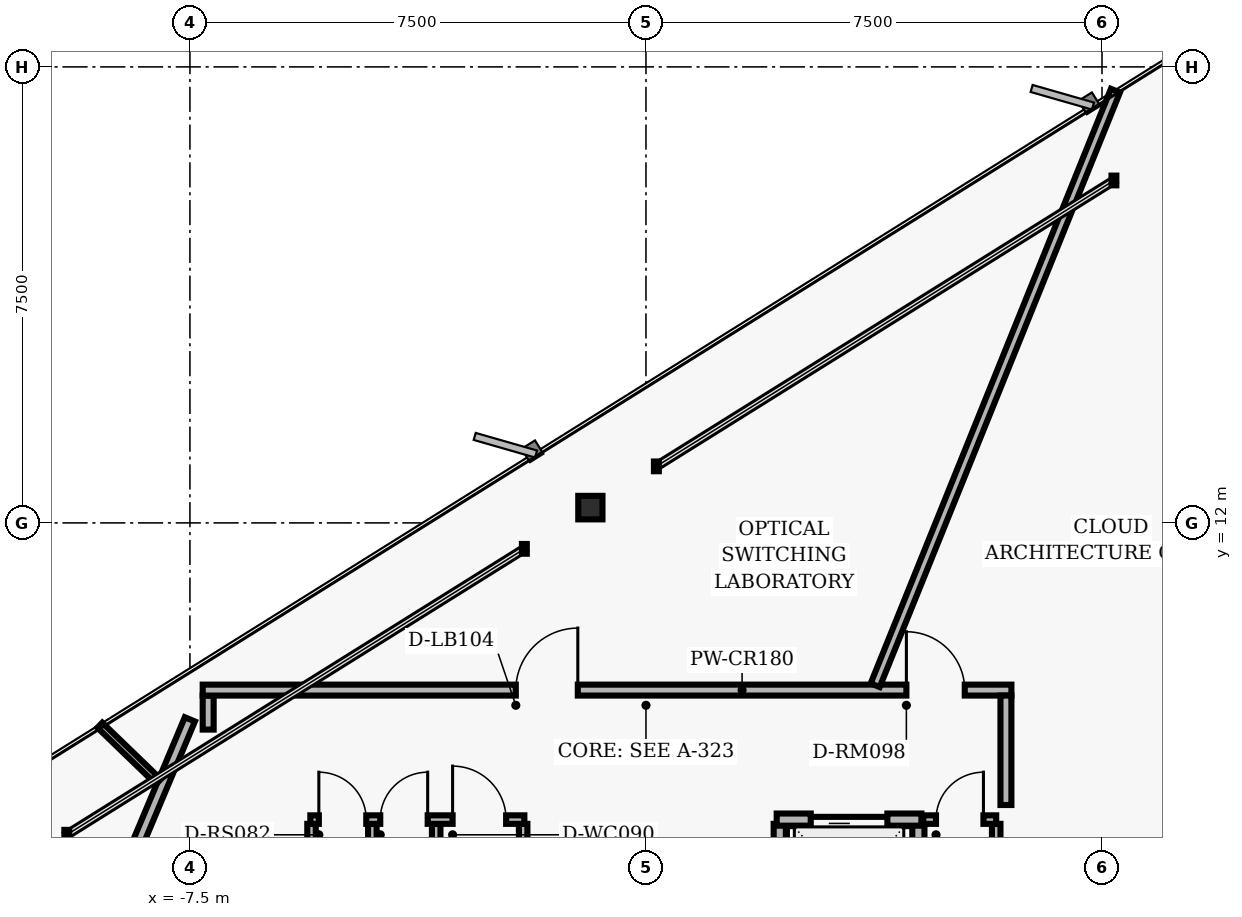
"""IFC4 building model, lengths in metres.
Left out: names, types, materials, properties, quantities, classifications, styles, units other than length and angle.
Written with IfcOpenShell. Run it as: python <this file> out.ifc"""

import sys

from ifc_helpers import new_model, si_unit, direction, frame, frame_2d, origin, origin_2d, place, context, subcontext, project, spatial, rectangle, i_section, extrude, element, fill, save


model = new_model("IFC4")
c1 = context("Model", 3, precision=1e-05, world=origin(), true_north=direction((0.0, 1.0)))
c2 = subcontext(c1, "Body", "Model", "MODEL_VIEW")
j1 = project(units=[si_unit("LENGTHUNIT", "METRE"), si_unit("PLANEANGLEUNIT", "RADIAN")], contexts=[c1])
p1 = place(None, origin())
s1 = spatial("IfcSite", under=j1, at=p1, CompositionType="ELEMENT")
p2 = place(p1, origin())
s2 = spatial("IfcBuilding", under=s1, at=p2, CompositionType="ELEMENT")
p3 = place(p2, frame((0.0, 0.0, 202.72)))
s3 = spatial("IfcBuildingStorey", under=s2, at=p3, CompositionType="ELEMENT", Elevation=202.72)
p4 = place(p3, frame((-0.915, 12.251, 0.0), z_axis=(0.0, 0.0, 1.0), x_axis=(1.0, 0.0, 0.0)))
e1 = element("IfcColumn", 1, at=p4, inside=s3, PredefinedType="COLUMN", context=c2, shape_type="SweptSolid", body=[
    extrude(i_section(OverallWidth=0.398, OverallDepth=0.387, WebThickness=0.021, FlangeThickness=0.033, FilletRadius=0.018, at=origin_2d()), origin(), (0.0, 0.0, 1.0), 3.04),
])
for number, where, z_axis, x_axis in (
    (2, (2.2, 4.95, 0.0), (0.0, 0.0, 1.0), (0.0, 1.0, 0.0)),
    (3, (4.48, 4.95, 0.0), (0.0, 0.0, 1.0), (0.0, 1.0, 0.0)),
):
    element("IfcWall", number, at=place(p3, frame(where, z_axis=z_axis, x_axis=x_axis)), inside=s3, PredefinedType="PARTITIONING", context=c2, shape_type="SweptSolid", body=[
        extrude(rectangle(XDim=2.1, YDim=0.2, at=frame_2d((1.05, 0.0))), origin(), (0.0, 0.0, 1.0), 2.773),
    ])
p5 = place(p3, frame((2.15, 7.12, 0.0), z_axis=(0.0, 0.0, 1.0), x_axis=(1.0, 0.0, 0.0)))
e4 = element("IfcWall", 4, at=p5, inside=s3, PredefinedType="PARTITIONING", context=c2, shape_type="SweptSolid", body=[
    extrude(rectangle(XDim=2.38, YDim=0.2, at=frame_2d((1.19, 0.0))), origin(), (0.0, 0.0, 1.0), 2.773),
])
p6 = place(p5, frame((0.56, 0.0, 0.0)))
e5 = element("IfcOpeningElement", 5, at=p6, cuts=e4, PredefinedType="OPENING", context=c2, shape_type="SweptSolid", body=[
    extrude(rectangle(XDim=1.26, YDim=2.06, at=frame_2d((0.63, 1.03))), frame((0.0, 0.11, 0.0), z_axis=(0.0, -1.0, 0.0), x_axis=(1.0, 0.0, 0.0)), (0.0, 0.0, 1.0), 0.22),
])
for number, where, z_axis, x_axis in (
    (6, (-5.5, 4.95, 0.0), (0.0, 0.0, 1.0), (0.0, 1.0, 0.0)),
    (7, (-4.5, 4.95, 0.0), (0.0, 0.0, 1.0), (0.0, 1.0, 0.0)),
    (8, (-3.45, 4.95, 0.0), (0.0, 0.0, 1.0), (0.0, 1.0, 0.0)),
    (9, (-2.02, 4.95, 0.0), (0.0, 0.0, 1.0), (0.0, 1.0, 0.0)),
):
    element("IfcWall", number, at=place(p3, frame(where, z_axis=z_axis, x_axis=x_axis)), inside=s3, PredefinedType="PARTITIONING", context=c2, shape_type="SweptSolid", body=[
        extrude(rectangle(XDim=2.1, YDim=0.14, at=frame_2d((1.05, 0.0))), origin(), (0.0, 0.0, 1.0), 2.773),
    ])
p7 = place(p3, frame((-5.52, 7.12, 0.0), z_axis=(0.0, 0.0, 1.0), x_axis=(1.0, 0.0, 0.0)))
e10 = element("IfcWall", 10, at=p7, inside=s3, PredefinedType="PARTITIONING", context=c2, shape_type="SweptSolid", body=[
    extrude(rectangle(XDim=3.52, YDim=0.14, at=frame_2d((1.76, 0.0))), origin(), (0.0, 0.0, 1.0), 2.773),
])
p8 = place(p7, frame((0.14, 0.0, 0.0)))
e11 = element("IfcOpeningElement", 11, at=p8, cuts=e10, PredefinedType="OPENING", context=c2, shape_type="SweptSolid", body=[
    extrude(rectangle(XDim=0.78, YDim=2.01, at=frame_2d((0.39, 1.005))), frame((0.0, 0.08, 0.0), z_axis=(0.0, -1.0, 0.0), x_axis=(1.0, 0.0, 0.0)), (0.0, 0.0, 1.0), 0.16),
])
p9 = place(p7, frame((1.15, 0.0, 0.0)))
e12 = element("IfcOpeningElement", 12, at=p9, cuts=e10, PredefinedType="OPENING", context=c2, shape_type="SweptSolid", body=[
    extrude(rectangle(XDim=0.78, YDim=2.01, at=frame_2d((0.39, 1.005))), frame((0.0, 0.08, 0.0), z_axis=(0.0, -1.0, 0.0), x_axis=(1.0, 0.0, 0.0)), (0.0, 0.0, 1.0), 0.16),
])
p10 = place(p7, frame((2.34, 0.0, 0.0)))
e13 = element("IfcOpeningElement", 13, at=p10, cuts=e10, PredefinedType="OPENING", context=c2, shape_type="SweptSolid", body=[
    extrude(rectangle(XDim=0.88, YDim=2.02, at=frame_2d((0.44, 1.01))), frame((0.0, 0.08, 0.0), z_axis=(0.0, -1.0, 0.0), x_axis=(1.0, 0.0, 0.0)), (0.0, 0.0, 1.0), 0.16),
])
p11 = place(p3, frame((5.76, 4.95, 0.0), z_axis=(0.0, 0.0, 1.0), x_axis=(0.0, 1.0, 0.0)))
e14 = element("IfcWall", 14, at=p11, inside=s3, PredefinedType="PARTITIONING", context=c2, shape_type="SweptSolid", body=[
    extrude(rectangle(XDim=2.1, YDim=0.14, at=frame_2d((1.05, 0.0))), origin(), (0.0, 0.0, 1.0), 2.253),
])
p12 = place(p3, frame((4.56, 7.12, 0.0), z_axis=(0.0, 0.0, 1.0), x_axis=(1.0, 0.0, 0.0)))
e15 = element("IfcWall", 15, at=p12, inside=s3, PredefinedType="PARTITIONING", context=c2, shape_type="SweptSolid", body=[
    extrude(rectangle(XDim=1.2, YDim=0.14, at=frame_2d((0.6, 0.0))), origin(), (0.0, 0.0, 1.0), 2.773),
])
p13 = place(p12, frame((0.21, 0.0, 0.0)))
e16 = element("IfcOpeningElement", 16, at=p13, cuts=e15, PredefinedType="OPENING", context=c2, shape_type="SweptSolid", body=[
    extrude(rectangle(XDim=0.78, YDim=2.01, at=frame_2d((0.39, 1.005))), frame((0.0, 0.08, 0.0), z_axis=(0.0, -1.0, 0.0), x_axis=(1.0, 0.0, 0.0)), (0.0, 0.0, 1.0), 0.16),
])
p14 = place(p3, frame((-9.367, 4.332, 0.0), z_axis=(0.0, 0.0, 1.0), x_axis=(0.387573945081, 0.921838617706, 0.0)))
e17 = element("IfcWall", 17, at=p14, inside=s3, PredefinedType="PARTITIONING", context=c2, shape_type="SweptSolid", body=[
    extrude(rectangle(XDim=4.813, YDim=0.18, at=frame_2d((2.407, 0.0))), origin(), (0.0, 0.0, 1.0), 2.773),
])
p15 = place(p3, frame((-7.2, 8.601, 0.0), z_axis=(0.0, 0.0, 1.0), x_axis=(0.0, 1.0, 0.0)))
e18 = element("IfcWall", 18, at=p15, inside=s3, PredefinedType="PARTITIONING", context=c2, shape_type="SweptSolid", body=[
    extrude(rectangle(XDim=0.559, YDim=0.18, at=frame_2d((0.28, 0.0))), origin(), (0.0, 0.0, 1.0), 2.773),
])
p16 = place(p3, frame((-7.29, 9.25, 0.0), z_axis=(0.0, 0.0, 1.0), x_axis=(1.0, 0.0, 0.0)))
e19 = element("IfcWall", 19, at=p16, inside=s3, PredefinedType="PARTITIONING", context=c2, shape_type="SweptSolid", body=[
    extrude(rectangle(XDim=13.3, YDim=0.18, at=frame_2d((6.65, 0.0))), origin(), (0.0, 0.0, 1.0), 2.773),
])
p17 = place(p16, frame((11.573, 0.0, 0.0)))
e20 = element("IfcOpeningElement", 20, at=p17, cuts=e19, PredefinedType="OPENING", context=c2, shape_type="SweptSolid", body=[
    extrude(rectangle(XDim=0.96, YDim=2.02, at=frame_2d((0.48, 1.01))), frame((0.0, 0.1, 0.0), z_axis=(0.0, -1.0, 0.0), x_axis=(1.0, 0.0, 0.0)), (0.0, 0.0, 1.0), 0.2),
])
p18 = place(p16, frame((5.149, 0.0, 0.0)))
e21 = element("IfcOpeningElement", 21, at=p18, cuts=e19, PredefinedType="OPENING", context=c2, shape_type="SweptSolid", body=[
    extrude(rectangle(XDim=1.02, YDim=2.02, at=frame_2d((0.51, 1.01))), frame((0.0, 0.1, 0.0), z_axis=(0.0, -1.0, 0.0), x_axis=(1.0, 0.0, 0.0)), (0.0, 0.0, 1.0), 0.2),
])
p19 = place(p3, frame((5.92, 9.16, 0.0), z_axis=(0.0, 0.0, 1.0), x_axis=(0.0, -1.0, 0.0)))
e22 = element("IfcWall", 22, at=p19, inside=s3, PredefinedType="PARTITIONING", context=c2, shape_type="SweptSolid", body=[
    extrude(rectangle(XDim=1.8, YDim=0.18, at=frame_2d((0.9, 0.0))), origin(), (0.0, 0.0, 1.0), 2.773),
])
p20 = place(p3, frame((3.77, 9.33, 0.0), z_axis=(0.0, 0.0, 1.0), x_axis=(0.374613070454, 0.927181237647, 0.0)))
e23 = element("IfcWall", 23, at=p20, inside=s3, PredefinedType="PARTITIONING", context=c2, shape_type="SweptSolid", body=[
    extrude(rectangle(XDim=10.547, YDim=0.16, at=frame_2d((5.274, 0.0))), origin(), (0.0, 0.0, 1.0), 2.773),
])
p21 = place(p3, frame((-8.019, 7.744, 0.0), z_axis=(0.0, 0.0, 1.0), x_axis=(-0.719319685721, 0.694679199151, 0.0)))
e24 = element("IfcWall", 24, at=p21, inside=s3, PredefinedType="MOVABLE", context=c2, shape_type="SweptSolid", body=[
    extrude(rectangle(XDim=1.338, YDim=0.115, at=frame_2d((0.669, 0.0))), origin(), (0.0, 0.0, 1.0), 2.773),
])
p22 = place(p6, origin())
e25 = element("IfcDoor", 25, at=p22, inside=s3, OperationType="SLIDING_TO_LEFT", PredefinedType="DOOR", context=c2, shape_type="SweptSolid", body=[
    extrude(rectangle(XDim=1.26, YDim=2.06, at=frame_2d((0.63, 1.03))), frame((0.0, 0.025, 0.0), z_axis=(0.0, -1.0, 0.0), x_axis=(1.0, 0.0, 0.0)), (0.0, 0.0, 1.0), 0.05),
])
fill(e5, e25)
p23 = place(p8, origin())
e26 = element("IfcDoor", 26, at=p23, inside=s3, OperationType="SINGLE_SWING_LEFT", PredefinedType="DOOR", context=c2, shape_type="SweptSolid", body=[
    extrude(rectangle(XDim=0.78, YDim=2.01, at=frame_2d((0.39, 1.005))), frame((0.0, 0.025, 0.0), z_axis=(0.0, -1.0, 0.0), x_axis=(1.0, 0.0, 0.0)), (0.0, 0.0, 1.0), 0.05),
])
fill(e11, e26)
p24 = place(p9, origin())
e27 = element("IfcDoor", 27, at=p24, inside=s3, OperationType="SINGLE_SWING_RIGHT", PredefinedType="DOOR", context=c2, shape_type="SweptSolid", body=[
    extrude(rectangle(XDim=0.78, YDim=2.01, at=frame_2d((0.39, 1.005))), frame((0.0, 0.025, 0.0), z_axis=(0.0, -1.0, 0.0), x_axis=(1.0, 0.0, 0.0)), (0.0, 0.0, 1.0), 0.05),
])
fill(e12, e27)
p25 = place(p10, origin())
e28 = element("IfcDoor", 28, at=p25, inside=s3, OperationType="SINGLE_SWING_LEFT", PredefinedType="DOOR", context=c2, shape_type="SweptSolid", body=[
    extrude(rectangle(XDim=0.88, YDim=2.02, at=frame_2d((0.44, 1.01))), frame((0.0, 0.025, 0.0), z_axis=(0.0, -1.0, 0.0), x_axis=(1.0, 0.0, 0.0)), (0.0, 0.0, 1.0), 0.05),
])
fill(e13, e28)
p26 = place(p13, origin())
e29 = element("IfcDoor", 29, at=p26, inside=s3, OperationType="SINGLE_SWING_RIGHT", PredefinedType="DOOR", context=c2, shape_type="SweptSolid", body=[
    extrude(rectangle(XDim=0.78, YDim=2.01, at=frame_2d((0.39, 1.005))), frame((0.0, 0.025, 0.0), z_axis=(0.0, -1.0, 0.0), x_axis=(1.0, 0.0, 0.0)), (0.0, 0.0, 1.0), 0.05),
])
fill(e16, e29)
p27 = place(p17, origin())
e30 = element("IfcDoor", 30, at=p27, inside=s3, OperationType="SINGLE_SWING_LEFT", PredefinedType="DOOR", context=c2, shape_type="SweptSolid", body=[
    extrude(rectangle(XDim=0.96, YDim=2.02, at=frame_2d((0.48, 1.01))), frame((0.0, 0.025, 0.0), z_axis=(0.0, -1.0, 0.0), x_axis=(1.0, 0.0, 0.0)), (0.0, 0.0, 1.0), 0.05),
])
fill(e20, e30)
p28 = place(p18, origin())
e31 = element("IfcDoor", 31, at=p28, inside=s3, OperationType="SINGLE_SWING_RIGHT", PredefinedType="DOOR", context=c2, shape_type="SweptSolid", body=[
    extrude(rectangle(XDim=1.02, YDim=2.02, at=frame_2d((0.51, 1.01))), frame((0.0, 0.025, 0.0), z_axis=(0.0, -1.0, 0.0), x_axis=(1.0, 0.0, 0.0)), (0.0, 0.0, 1.0), 0.05),
])
fill(e21, e31)
save(model, sys.argv[1])
